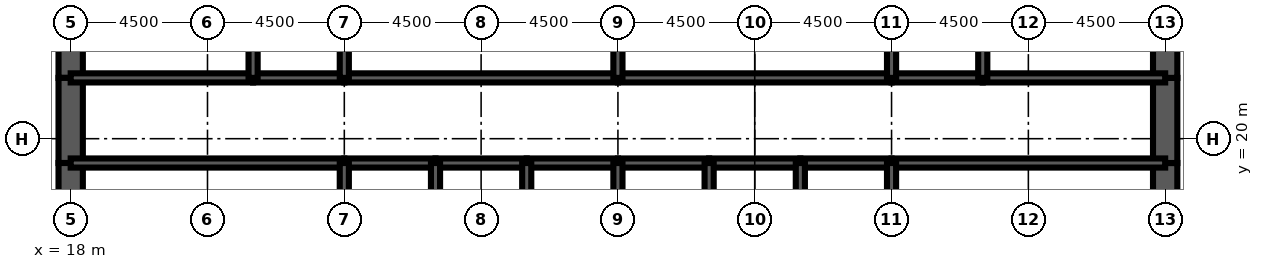
"""IFC4 building model, lengths in metres.
Left out: names, types, materials, properties, quantities, classifications, styles, units other than length and angle.
Written with IfcOpenShell. Run it as: python <this file> out.ifc"""

import sys

from ifc_helpers import new_model, si_unit, direction, frame, frame_2d, origin, place, context, subcontext, project, spatial, rectangle, extrude, element, fill, save


model = new_model("IFC4")
c1 = context("Model", 3, precision=1e-05, world=origin(), true_north=direction((0.0, 1.0)))
c2 = subcontext(c1, "Body", "Model", "MODEL_VIEW")
j1 = project(units=[si_unit("LENGTHUNIT", "METRE"), si_unit("PLANEANGLEUNIT", "RADIAN")], contexts=[c1])
p1 = place(None, origin())
s1 = spatial("IfcSite", under=j1, at=p1, CompositionType="ELEMENT")
p2 = place(p1, origin())
s2 = spatial("IfcBuilding", under=s1, at=p2, CompositionType="ELEMENT")
p3 = place(p2, frame((0.0, 0.0, 206.8)))
s3 = spatial("IfcBuildingStorey", under=s2, at=p3, CompositionType="ELEMENT", Elevation=206.8)
p4 = place(p3, frame((18.0, 26.0, 0.0), z_axis=(0.0, 0.0, 1.0), x_axis=(0.0, -1.0, 0.0)))
e1 = element("IfcWall", 1, at=p4, inside=s3, PredefinedType="SHEAR", context=c2, shape_type="SweptSolid", body=[
    extrude(rectangle(XDim=4.0, YDim=0.8, at=frame_2d((2.0, 0.0))), origin(), (0.0, 0.0, 1.0), 4.2),
])
p5 = place(p3, frame((18.0, 22.0, 0.0), z_axis=(0.0, 0.0, 1.0), x_axis=(0.0, -1.0, 0.0)))
e2 = element("IfcWall", 2, at=p5, inside=s3, PredefinedType="SHEAR", context=c2, shape_type="SweptSolid", body=[
    extrude(rectangle(XDim=2.8, YDim=0.8, at=frame_2d((1.4, 0.0))), origin(), (0.0, 0.0, 1.0), 4.2),
])
p6 = place(p5, frame((0.6, 0.0, 0.0)))
e3 = element("IfcOpeningElement", 3, at=p6, cuts=e2, PredefinedType="OPENING", context=c2, shape_type="SweptSolid", body=[
    extrude(rectangle(XDim=1.8, YDim=2.1, at=frame_2d((0.9, 1.05))), frame((0.0, 0.41, 0.0), z_axis=(0.0, -1.0, 0.0), x_axis=(1.0, 0.0, 0.0)), (0.0, 0.0, 1.0), 0.82),
])
for number, where, z_axis, x_axis in (
    (4, (18.0, 19.2, 0.0), (0.0, 0.0, 1.0), (0.0, -1.0, 0.0)),
    (5, (54.0, 16.0, 0.0), (0.0, 0.0, 1.0), (0.0, 1.0, 0.0)),
):
    element("IfcWall", number, at=place(p3, frame(where, z_axis=z_axis, x_axis=x_axis)), inside=s3, PredefinedType="SHEAR", context=c2, shape_type="SweptSolid", body=[
        extrude(rectangle(XDim=3.2, YDim=0.8, at=frame_2d((1.6, 0.0))), origin(), (0.0, 0.0, 1.0), 4.2),
    ])
p7 = place(p3, frame((54.0, 19.2, 0.0), z_axis=(0.0, 0.0, 1.0), x_axis=(0.0, 1.0, 0.0)))
e6 = element("IfcWall", 6, at=p7, inside=s3, PredefinedType="SHEAR", context=c2, shape_type="SweptSolid", body=[
    extrude(rectangle(XDim=2.8, YDim=0.8, at=frame_2d((1.4, 0.0))), origin(), (0.0, 0.0, 1.0), 4.2),
])
p8 = place(p7, frame((0.4, 0.0, 0.0)))
e7 = element("IfcOpeningElement", 7, at=p8, cuts=e6, PredefinedType="OPENING", context=c2, shape_type="SweptSolid", body=[
    extrude(rectangle(XDim=1.8, YDim=2.1, at=frame_2d((0.9, 1.05))), frame((0.0, 0.41, 0.0), z_axis=(0.0, -1.0, 0.0), x_axis=(1.0, 0.0, 0.0)), (0.0, 0.0, 1.0), 0.82),
])
p9 = place(p3, frame((54.0, 22.0, 0.0), z_axis=(0.0, 0.0, 1.0), x_axis=(0.0, 1.0, 0.0)))
e8 = element("IfcWall", 8, at=p9, inside=s3, PredefinedType="SHEAR", context=c2, shape_type="SweptSolid", body=[
    extrude(rectangle(XDim=4.0, YDim=0.8, at=frame_2d((2.0, 0.0))), origin(), (0.0, 0.0, 1.0), 4.2),
])
p10 = place(p3, frame((18.0, 19.2, 0.0), z_axis=(0.0, 0.0, 1.0), x_axis=(1.0, 0.0, 0.0)))
e9 = element("IfcWall", 9, at=p10, inside=s3, PredefinedType="SOLIDWALL", context=c2, shape_type="SweptSolid", body=[
    extrude(rectangle(XDim=9.0, YDim=0.3, at=frame_2d((4.5, 0.0))), origin(), (0.0, 0.0, 1.0), 4.2),
])
p11 = place(p10, frame((0.65, 0.0, 0.0)))
e10 = element("IfcOpeningElement", 10, at=p11, cuts=e9, PredefinedType="OPENING", context=c2, shape_type="SweptSolid", body=[
    extrude(rectangle(XDim=1.0, YDim=2.1, at=frame_2d((0.5, 1.05))), frame((0.0, 0.16, 0.0), z_axis=(0.0, -1.0, 0.0), x_axis=(1.0, 0.0, 0.0)), (0.0, 0.0, 1.0), 0.32),
])
p12 = place(p3, frame((27.0, 19.2, 0.0), z_axis=(0.0, 0.0, 1.0), x_axis=(1.0, 0.0, 0.0)))
e11 = element("IfcWall", 11, at=p12, inside=s3, PredefinedType="SOLIDWALL", context=c2, shape_type="SweptSolid", body=[
    extrude(rectangle(XDim=3.0, YDim=0.3, at=frame_2d((1.5, 0.0))), origin(), (0.0, 0.0, 1.0), 4.2),
])
p13 = place(p12, frame((0.95, 0.0, 0.0)))
e12 = element("IfcOpeningElement", 12, at=p13, cuts=e11, PredefinedType="OPENING", context=c2, shape_type="SweptSolid", body=[
    extrude(rectangle(XDim=1.1, YDim=2.2, at=frame_2d((0.55, 1.1))), frame((0.0, 0.16, 0.0), z_axis=(0.0, -1.0, 0.0), x_axis=(1.0, 0.0, 0.0)), (0.0, 0.0, 1.0), 0.32),
])
p14 = place(p3, frame((30.0, 19.2, 0.0), z_axis=(0.0, 0.0, 1.0), x_axis=(1.0, 0.0, 0.0)))
e13 = element("IfcWall", 13, at=p14, inside=s3, PredefinedType="SOLIDWALL", context=c2, shape_type="SweptSolid", body=[
    extrude(rectangle(XDim=3.0, YDim=0.3, at=frame_2d((1.5, 0.0))), origin(), (0.0, 0.0, 1.0), 4.2),
])
p15 = place(p14, frame((0.95, 0.0, 0.0)))
e14 = element("IfcOpeningElement", 14, at=p15, cuts=e13, PredefinedType="OPENING", context=c2, shape_type="SweptSolid", body=[
    extrude(rectangle(XDim=1.1, YDim=2.2, at=frame_2d((0.55, 1.1))), frame((0.0, 0.16, 0.0), z_axis=(0.0, -1.0, 0.0), x_axis=(1.0, 0.0, 0.0)), (0.0, 0.0, 1.0), 0.32),
])
p16 = place(p3, frame((33.0, 19.2, 0.0), z_axis=(0.0, 0.0, 1.0), x_axis=(1.0, 0.0, 0.0)))
e15 = element("IfcWall", 15, at=p16, inside=s3, PredefinedType="SOLIDWALL", context=c2, shape_type="SweptSolid", body=[
    extrude(rectangle(XDim=3.0, YDim=0.3, at=frame_2d((1.5, 0.0))), origin(), (0.0, 0.0, 1.0), 4.2),
])
p17 = place(p16, frame((0.95, 0.0, 0.0)))
e16 = element("IfcOpeningElement", 16, at=p17, cuts=e15, PredefinedType="OPENING", context=c2, shape_type="SweptSolid", body=[
    extrude(rectangle(XDim=1.1, YDim=2.2, at=frame_2d((0.55, 1.1))), frame((0.0, 0.16, 0.0), z_axis=(0.0, -1.0, 0.0), x_axis=(1.0, 0.0, 0.0)), (0.0, 0.0, 1.0), 0.32),
])
p18 = place(p3, frame((36.0, 19.2, 0.0), z_axis=(0.0, 0.0, 1.0), x_axis=(1.0, 0.0, 0.0)))
e17 = element("IfcWall", 17, at=p18, inside=s3, PredefinedType="SOLIDWALL", context=c2, shape_type="SweptSolid", body=[
    extrude(rectangle(XDim=3.0, YDim=0.3, at=frame_2d((1.5, 0.0))), origin(), (0.0, 0.0, 1.0), 4.2),
])
p19 = place(p18, frame((0.95, 0.0, 0.0)))
e18 = element("IfcOpeningElement", 18, at=p19, cuts=e17, PredefinedType="OPENING", context=c2, shape_type="SweptSolid", body=[
    extrude(rectangle(XDim=1.1, YDim=2.2, at=frame_2d((0.55, 1.1))), frame((0.0, 0.16, 0.0), z_axis=(0.0, -1.0, 0.0), x_axis=(1.0, 0.0, 0.0)), (0.0, 0.0, 1.0), 0.32),
])
p20 = place(p3, frame((39.0, 19.2, 0.0), z_axis=(0.0, 0.0, 1.0), x_axis=(1.0, 0.0, 0.0)))
e19 = element("IfcWall", 19, at=p20, inside=s3, PredefinedType="SOLIDWALL", context=c2, shape_type="SweptSolid", body=[
    extrude(rectangle(XDim=3.0, YDim=0.3, at=frame_2d((1.5, 0.0))), origin(), (0.0, 0.0, 1.0), 4.2),
])
p21 = place(p20, frame((1.0, 0.0, 0.0)))
e20 = element("IfcOpeningElement", 20, at=p21, cuts=e19, PredefinedType="OPENING", context=c2, shape_type="SweptSolid", body=[
    extrude(rectangle(XDim=1.0, YDim=2.1, at=frame_2d((0.5, 1.05))), frame((0.0, 0.16, 0.0), z_axis=(0.0, -1.0, 0.0), x_axis=(1.0, 0.0, 0.0)), (0.0, 0.0, 1.0), 0.32),
])
p22 = place(p3, frame((42.0, 19.2, 0.0), z_axis=(0.0, 0.0, 1.0), x_axis=(1.0, 0.0, 0.0)))
e21 = element("IfcWall", 21, at=p22, inside=s3, PredefinedType="SOLIDWALL", context=c2, shape_type="SweptSolid", body=[
    extrude(rectangle(XDim=3.0, YDim=0.3, at=frame_2d((1.5, 0.0))), origin(), (0.0, 0.0, 1.0), 4.2),
])
p23 = place(p22, frame((1.0, 0.0, 0.0)))
e22 = element("IfcOpeningElement", 22, at=p23, cuts=e21, PredefinedType="OPENING", context=c2, shape_type="SweptSolid", body=[
    extrude(rectangle(XDim=1.0, YDim=2.1, at=frame_2d((0.5, 1.05))), frame((0.0, 0.16, 0.0), z_axis=(0.0, -1.0, 0.0), x_axis=(1.0, 0.0, 0.0)), (0.0, 0.0, 1.0), 0.32),
])
p24 = place(p3, frame((45.0, 19.2, 0.0), z_axis=(0.0, 0.0, 1.0), x_axis=(1.0, 0.0, 0.0)))
e23 = element("IfcWall", 23, at=p24, inside=s3, PredefinedType="SOLIDWALL", context=c2, shape_type="SweptSolid", body=[
    extrude(rectangle(XDim=9.0, YDim=0.3, at=frame_2d((4.5, 0.0))), origin(), (0.0, 0.0, 1.0), 4.2),
])
p25 = place(p24, frame((7.35, 0.0, 0.0)))
e24 = element("IfcOpeningElement", 24, at=p25, cuts=e23, PredefinedType="OPENING", context=c2, shape_type="SweptSolid", body=[
    extrude(rectangle(XDim=1.0, YDim=2.1, at=frame_2d((0.5, 1.05))), frame((0.0, 0.16, 0.0), z_axis=(0.0, -1.0, 0.0), x_axis=(1.0, 0.0, 0.0)), (0.0, 0.0, 1.0), 0.32),
])
p26 = place(p3, frame((18.0, 22.0, 0.0), z_axis=(0.0, 0.0, 1.0), x_axis=(1.0, 0.0, 0.0)))
e25 = element("IfcWall", 25, at=p26, inside=s3, PredefinedType="SOLIDWALL", context=c2, shape_type="SweptSolid", body=[
    extrude(rectangle(XDim=6.0, YDim=0.3, at=frame_2d((3.0, 0.0))), origin(), (0.0, 0.0, 1.0), 4.2),
])
p27 = place(p26, frame((4.4, 0.0, 0.0)))
e26 = element("IfcOpeningElement", 26, at=p27, cuts=e25, PredefinedType="OPENING", context=c2, shape_type="SweptSolid", body=[
    extrude(rectangle(XDim=1.0, YDim=2.1, at=frame_2d((0.5, 1.05))), frame((0.0, 0.16, 0.0), z_axis=(0.0, -1.0, 0.0), x_axis=(1.0, 0.0, 0.0)), (0.0, 0.0, 1.0), 0.32),
])
p28 = place(p26, frame((0.95, 0.0, 0.0)))
e27 = element("IfcOpeningElement", 27, at=p28, cuts=e25, PredefinedType="OPENING", context=c2, shape_type="SweptSolid", body=[
    extrude(rectangle(XDim=1.0, YDim=2.1, at=frame_2d((0.5, 1.05))), frame((0.0, 0.16, 0.0), z_axis=(0.0, -1.0, 0.0), x_axis=(1.0, 0.0, 0.0)), (0.0, 0.0, 1.0), 0.32),
])
p29 = place(p3, frame((24.0, 22.0, 0.0), z_axis=(0.0, 0.0, 1.0), x_axis=(1.0, 0.0, 0.0)))
e28 = element("IfcWall", 28, at=p29, inside=s3, PredefinedType="SOLIDWALL", context=c2, shape_type="SweptSolid", body=[
    extrude(rectangle(XDim=3.0, YDim=0.3, at=frame_2d((1.5, 0.0))), origin(), (0.0, 0.0, 1.0), 4.2),
])
p30 = place(p29, frame((1.0, 0.0, 0.0)))
e29 = element("IfcOpeningElement", 29, at=p30, cuts=e28, PredefinedType="OPENING", context=c2, shape_type="SweptSolid", body=[
    extrude(rectangle(XDim=1.0, YDim=2.1, at=frame_2d((0.5, 1.05))), frame((0.0, 0.16, 0.0), z_axis=(0.0, -1.0, 0.0), x_axis=(1.0, 0.0, 0.0)), (0.0, 0.0, 1.0), 0.32),
])
p31 = place(p3, frame((27.0, 22.0, 0.0), z_axis=(0.0, 0.0, 1.0), x_axis=(1.0, 0.0, 0.0)))
e30 = element("IfcWall", 30, at=p31, inside=s3, PredefinedType="SOLIDWALL", context=c2, shape_type="SweptSolid", body=[
    extrude(rectangle(XDim=9.0, YDim=0.3, at=frame_2d((4.5, 0.0))), origin(), (0.0, 0.0, 1.0), 4.2),
])
p32 = place(p31, frame((4.0, 0.0, 0.0)))
e31 = element("IfcOpeningElement", 31, at=p32, cuts=e30, PredefinedType="OPENING", context=c2, shape_type="SweptSolid", body=[
    extrude(rectangle(XDim=1.0, YDim=2.1, at=frame_2d((0.5, 1.05))), frame((0.0, 0.16, 0.0), z_axis=(0.0, -1.0, 0.0), x_axis=(1.0, 0.0, 0.0)), (0.0, 0.0, 1.0), 0.32),
])
p33 = place(p3, frame((36.0, 22.0, 0.0), z_axis=(0.0, 0.0, 1.0), x_axis=(1.0, 0.0, 0.0)))
e32 = element("IfcWall", 32, at=p33, inside=s3, PredefinedType="SOLIDWALL", context=c2, shape_type="SweptSolid", body=[
    extrude(rectangle(XDim=9.0, YDim=0.3, at=frame_2d((4.5, 0.0))), origin(), (0.0, 0.0, 1.0), 4.2),
])
p34 = place(p33, frame((4.0, 0.0, 0.0)))
e33 = element("IfcOpeningElement", 33, at=p34, cuts=e32, PredefinedType="OPENING", context=c2, shape_type="SweptSolid", body=[
    extrude(rectangle(XDim=1.0, YDim=2.1, at=frame_2d((0.5, 1.05))), frame((0.0, 0.16, 0.0), z_axis=(0.0, -1.0, 0.0), x_axis=(1.0, 0.0, 0.0)), (0.0, 0.0, 1.0), 0.32),
])
p35 = place(p3, frame((45.0, 22.0, 0.0), z_axis=(0.0, 0.0, 1.0), x_axis=(1.0, 0.0, 0.0)))
e34 = element("IfcWall", 34, at=p35, inside=s3, PredefinedType="SOLIDWALL", context=c2, shape_type="SweptSolid", body=[
    extrude(rectangle(XDim=3.0, YDim=0.3, at=frame_2d((1.5, 0.0))), origin(), (0.0, 0.0, 1.0), 4.2),
])
p36 = place(p35, frame((1.0, 0.0, 0.0)))
e35 = element("IfcOpeningElement", 35, at=p36, cuts=e34, PredefinedType="OPENING", context=c2, shape_type="SweptSolid", body=[
    extrude(rectangle(XDim=1.0, YDim=2.1, at=frame_2d((0.5, 1.05))), frame((0.0, 0.16, 0.0), z_axis=(0.0, -1.0, 0.0), x_axis=(1.0, 0.0, 0.0)), (0.0, 0.0, 1.0), 0.32),
])
p37 = place(p3, frame((48.0, 22.0, 0.0), z_axis=(0.0, 0.0, 1.0), x_axis=(1.0, 0.0, 0.0)))
e36 = element("IfcWall", 36, at=p37, inside=s3, PredefinedType="SOLIDWALL", context=c2, shape_type="SweptSolid", body=[
    extrude(rectangle(XDim=6.0, YDim=0.3, at=frame_2d((3.0, 0.0))), origin(), (0.0, 0.0, 1.0), 4.2),
])
p38 = place(p37, frame((2.0, 0.0, 0.0)))
e37 = element("IfcOpeningElement", 37, at=p38, cuts=e36, PredefinedType="OPENING", context=c2, shape_type="SweptSolid", body=[
    extrude(rectangle(XDim=1.0, YDim=2.1, at=frame_2d((0.5, 1.05))), frame((0.0, 0.16, 0.0), z_axis=(0.0, -1.0, 0.0), x_axis=(1.0, 0.0, 0.0)), (0.0, 0.0, 1.0), 0.32),
])
p39 = place(p37, frame((4.35, 0.0, 0.0)))
e38 = element("IfcOpeningElement", 38, at=p39, cuts=e36, PredefinedType="OPENING", context=c2, shape_type="SweptSolid", body=[
    extrude(rectangle(XDim=1.0, YDim=2.1, at=frame_2d((0.5, 1.05))), frame((0.0, 0.16, 0.0), z_axis=(0.0, -1.0, 0.0), x_axis=(1.0, 0.0, 0.0)), (0.0, 0.0, 1.0), 0.32),
])
for number, where, z_axis, x_axis in (
    (39, (27.0, 16.0, 0.0), (0.0, 0.0, 1.0), (0.0, 1.0, 0.0)),
    (40, (30.0, 16.0, 0.0), (0.0, 0.0, 1.0), (0.0, 1.0, 0.0)),
    (41, (33.0, 16.0, 0.0), (0.0, 0.0, 1.0), (0.0, 1.0, 0.0)),
    (42, (36.0, 16.0, 0.0), (0.0, 0.0, 1.0), (0.0, 1.0, 0.0)),
    (43, (39.0, 16.0, 0.0), (0.0, 0.0, 1.0), (0.0, 1.0, 0.0)),
    (44, (42.0, 16.0, 0.0), (0.0, 0.0, 1.0), (0.0, 1.0, 0.0)),
    (45, (45.0, 16.0, 0.0), (0.0, 0.0, 1.0), (0.0, 1.0, 0.0)),
):
    element("IfcWall", number, at=place(p3, frame(where, z_axis=z_axis, x_axis=x_axis)), inside=s3, PredefinedType="SOLIDWALL", context=c2, shape_type="SweptSolid", body=[
        extrude(rectangle(XDim=3.2, YDim=0.3, at=frame_2d((1.6, 0.0))), origin(), (0.0, 0.0, 1.0), 4.2),
    ])
for number, where, z_axis, x_axis in (
    (46, (24.0, 22.0, 0.0), (0.0, 0.0, 1.0), (0.0, 1.0, 0.0)),
    (47, (27.0, 22.0, 0.0), (0.0, 0.0, 1.0), (0.0, 1.0, 0.0)),
    (48, (36.0, 22.0, 0.0), (0.0, 0.0, 1.0), (0.0, 1.0, 0.0)),
    (49, (45.0, 22.0, 0.0), (0.0, 0.0, 1.0), (0.0, 1.0, 0.0)),
    (50, (48.0, 22.0, 0.0), (0.0, 0.0, 1.0), (0.0, 1.0, 0.0)),
):
    element("IfcWall", number, at=place(p3, frame(where, z_axis=z_axis, x_axis=x_axis)), inside=s3, PredefinedType="SOLIDWALL", context=c2, shape_type="SweptSolid", body=[
        extrude(rectangle(XDim=4.0, YDim=0.3, at=frame_2d((2.0, 0.0))), origin(), (0.0, 0.0, 1.0), 4.2),
    ])
p40 = place(p3, frame((38.0, 22.15, 0.0), z_axis=(0.0, 0.0, 1.0), x_axis=(0.0, 1.0, 0.0)))
e51 = element("IfcWall", 51, at=p40, inside=s3, PredefinedType="PARTITIONING", context=c2, shape_type="SweptSolid", body=[
    extrude(rectangle(XDim=3.7, YDim=0.15, at=frame_2d((1.85, 0.0))), origin(), (0.0, 0.0, 1.0), 3.0),
])
p41 = place(p40, frame((2.2, 0.0, 0.0)))
e52 = element("IfcOpeningElement", 52, at=p41, cuts=e51, PredefinedType="OPENING", context=c2, shape_type="SweptSolid", body=[
    extrude(rectangle(XDim=1.0, YDim=2.1, at=frame_2d((0.5, 1.05))), frame((0.0, 0.085, 0.0), z_axis=(0.0, -1.0, 0.0), x_axis=(1.0, 0.0, 0.0)), (0.0, 0.0, 1.0), 0.17),
])
for number, where, z_axis, x_axis in (
    (53, (20.575, 22.15, 0.0), (0.0, 0.0, 1.0), (0.0, 1.0, 0.0)),
    (54, (52.025, 22.15, 0.0), (0.0, 0.0, 1.0), (0.0, 1.0, 0.0)),
):
    element("IfcWall", number, at=place(p3, frame(where, z_axis=z_axis, x_axis=x_axis)), inside=s3, PredefinedType="PARTITIONING", context=c2, shape_type="SweptSolid", body=[
        extrude(rectangle(XDim=3.7, YDim=0.15, at=frame_2d((1.85, 0.0))), origin(), (0.0, 0.0, 1.0), 3.0),
    ])
p42 = place(p13, origin())
e55 = element("IfcDoor", 55, at=p42, inside=s3, OperationType="DOUBLE_DOOR_SLIDING", PredefinedType="USERDEFINED", context=c2, shape_type="SweptSolid", body=[
    extrude(rectangle(XDim=1.1, YDim=2.2, at=frame_2d((0.55, 1.1))), frame((0.0, 0.025, 0.0), z_axis=(0.0, -1.0, 0.0), x_axis=(1.0, 0.0, 0.0)), (0.0, 0.0, 1.0), 0.05),
])
fill(e12, e55)
p43 = place(p15, origin())
e56 = element("IfcDoor", 56, at=p43, inside=s3, OperationType="DOUBLE_DOOR_SLIDING", PredefinedType="USERDEFINED", context=c2, shape_type="SweptSolid", body=[
    extrude(rectangle(XDim=1.1, YDim=2.2, at=frame_2d((0.55, 1.1))), frame((0.0, 0.025, 0.0), z_axis=(0.0, -1.0, 0.0), x_axis=(1.0, 0.0, 0.0)), (0.0, 0.0, 1.0), 0.05),
])
fill(e14, e56)
p44 = place(p17, origin())
e57 = element("IfcDoor", 57, at=p44, inside=s3, OperationType="DOUBLE_DOOR_SLIDING", PredefinedType="USERDEFINED", context=c2, shape_type="SweptSolid", body=[
    extrude(rectangle(XDim=1.1, YDim=2.2, at=frame_2d((0.55, 1.1))), frame((0.0, 0.025, 0.0), z_axis=(0.0, -1.0, 0.0), x_axis=(1.0, 0.0, 0.0)), (0.0, 0.0, 1.0), 0.05),
])
fill(e16, e57)
p45 = place(p19, origin())
e58 = element("IfcDoor", 58, at=p45, inside=s3, OperationType="DOUBLE_DOOR_SLIDING", PredefinedType="USERDEFINED", context=c2, shape_type="SweptSolid", body=[
    extrude(rectangle(XDim=1.1, YDim=2.2, at=frame_2d((0.55, 1.1))), frame((0.0, 0.025, 0.0), z_axis=(0.0, -1.0, 0.0), x_axis=(1.0, 0.0, 0.0)), (0.0, 0.0, 1.0), 0.05),
])
fill(e18, e58)
p46 = place(p11, origin())
e59 = element("IfcDoor", 59, at=p46, inside=s3, OperationType="SINGLE_SWING_LEFT", PredefinedType="DOOR", context=c2, shape_type="SweptSolid", body=[
    extrude(rectangle(XDim=1.0, YDim=2.1, at=frame_2d((0.5, 1.05))), frame((0.0, 0.025, 0.0), z_axis=(0.0, -1.0, 0.0), x_axis=(1.0, 0.0, 0.0)), (0.0, 0.0, 1.0), 0.05),
])
fill(e10, e59)
p47 = place(p25, origin())
e60 = element("IfcDoor", 60, at=p47, inside=s3, OperationType="SINGLE_SWING_RIGHT", PredefinedType="DOOR", context=c2, shape_type="SweptSolid", body=[
    extrude(rectangle(XDim=1.0, YDim=2.1, at=frame_2d((0.5, 1.05))), frame((0.0, 0.025, 0.0), z_axis=(0.0, -1.0, 0.0), x_axis=(1.0, 0.0, 0.0)), (0.0, 0.0, 1.0), 0.05),
])
fill(e24, e60)
p48 = place(p6, origin())
e61 = element("IfcDoor", 61, at=p48, inside=s3, OperationType="SINGLE_SWING_LEFT", PredefinedType="DOOR", context=c2, shape_type="SweptSolid", body=[
    extrude(rectangle(XDim=1.8, YDim=2.1, at=frame_2d((0.9, 1.05))), frame((0.0, 0.4, 0.0), z_axis=(0.0, -1.0, 0.0), x_axis=(1.0, 0.0, 0.0)), (0.0, 0.0, 1.0), 0.8),
])
fill(e3, e61)
p49 = place(p8, origin())
e62 = element("IfcDoor", 62, at=p49, inside=s3, OperationType="SINGLE_SWING_LEFT", PredefinedType="DOOR", context=c2, shape_type="SweptSolid", body=[
    extrude(rectangle(XDim=1.8, YDim=2.1, at=frame_2d((0.9, 1.05))), frame((0.0, 0.4, 0.0), z_axis=(0.0, -1.0, 0.0), x_axis=(1.0, 0.0, 0.0)), (0.0, 0.0, 1.0), 0.8),
])
fill(e7, e62)
p50 = place(p27, origin())
e63 = element("IfcDoor", 63, at=p50, inside=s3, OperationType="SINGLE_SWING_RIGHT", PredefinedType="DOOR", context=c2, shape_type="SweptSolid", body=[
    extrude(rectangle(XDim=1.0, YDim=2.1, at=frame_2d((0.5, 1.05))), frame((0.0, 0.025, 0.0), z_axis=(0.0, -1.0, 0.0), x_axis=(1.0, 0.0, 0.0)), (0.0, 0.0, 1.0), 0.05),
])
fill(e26, e63)
p51 = place(p30, origin())
e64 = element("IfcDoor", 64, at=p51, inside=s3, OperationType="SINGLE_SWING_LEFT", PredefinedType="DOOR", context=c2, shape_type="SweptSolid", body=[
    extrude(rectangle(XDim=1.0, YDim=2.1, at=frame_2d((0.5, 1.05))), frame((0.0, 0.025, 0.0), z_axis=(0.0, -1.0, 0.0), x_axis=(1.0, 0.0, 0.0)), (0.0, 0.0, 1.0), 0.05),
])
fill(e29, e64)
p52 = place(p32, origin())
e65 = element("IfcDoor", 65, at=p52, inside=s3, OperationType="SINGLE_SWING_LEFT", PredefinedType="DOOR", context=c2, shape_type="SweptSolid", body=[
    extrude(rectangle(XDim=1.0, YDim=2.1, at=frame_2d((0.5, 1.05))), frame((0.0, 0.025, 0.0), z_axis=(0.0, -1.0, 0.0), x_axis=(1.0, 0.0, 0.0)), (0.0, 0.0, 1.0), 0.05),
])
fill(e31, e65)
p53 = place(p34, origin())
e66 = element("IfcDoor", 66, at=p53, inside=s3, OperationType="SINGLE_SWING_LEFT", PredefinedType="DOOR", context=c2, shape_type="SweptSolid", body=[
    extrude(rectangle(XDim=1.0, YDim=2.1, at=frame_2d((0.5, 1.05))), frame((0.0, 0.025, 0.0), z_axis=(0.0, -1.0, 0.0), x_axis=(1.0, 0.0, 0.0)), (0.0, 0.0, 1.0), 0.05),
])
fill(e33, e66)
p54 = place(p36, origin())
e67 = element("IfcDoor", 67, at=p54, inside=s3, OperationType="SINGLE_SWING_LEFT", PredefinedType="DOOR", context=c2, shape_type="SweptSolid", body=[
    extrude(rectangle(XDim=1.0, YDim=2.1, at=frame_2d((0.5, 1.05))), frame((0.0, 0.025, 0.0), z_axis=(0.0, -1.0, 0.0), x_axis=(1.0, 0.0, 0.0)), (0.0, 0.0, 1.0), 0.05),
])
fill(e35, e67)
p55 = place(p38, origin())
e68 = element("IfcDoor", 68, at=p55, inside=s3, OperationType="SINGLE_SWING_LEFT", PredefinedType="DOOR", context=c2, shape_type="SweptSolid", body=[
    extrude(rectangle(XDim=1.0, YDim=2.1, at=frame_2d((0.5, 1.05))), frame((0.0, 0.025, 0.0), z_axis=(0.0, -1.0, 0.0), x_axis=(1.0, 0.0, 0.0)), (0.0, 0.0, 1.0), 0.05),
])
fill(e37, e68)
p56 = place(p28, origin())
e69 = element("IfcDoor", 69, at=p56, inside=s3, OperationType="SINGLE_SWING_LEFT", PredefinedType="DOOR", context=c2, shape_type="SweptSolid", body=[
    extrude(rectangle(XDim=1.0, YDim=2.1, at=frame_2d((0.5, 1.05))), frame((0.0, 0.025, 0.0), z_axis=(0.0, -1.0, 0.0), x_axis=(1.0, 0.0, 0.0)), (0.0, 0.0, 1.0), 0.05),
])
fill(e27, e69)
p57 = place(p39, origin())
e70 = element("IfcDoor", 70, at=p57, inside=s3, OperationType="SINGLE_SWING_RIGHT", PredefinedType="DOOR", context=c2, shape_type="SweptSolid", body=[
    extrude(rectangle(XDim=1.0, YDim=2.1, at=frame_2d((0.5, 1.05))), frame((0.0, 0.025, 0.0), z_axis=(0.0, -1.0, 0.0), x_axis=(1.0, 0.0, 0.0)), (0.0, 0.0, 1.0), 0.05),
])
fill(e38, e70)
p58 = place(p21, origin())
e71 = element("IfcDoor", 71, at=p58, inside=s3, OperationType="SINGLE_SWING_LEFT", PredefinedType="DOOR", context=c2, shape_type="SweptSolid", body=[
    extrude(rectangle(XDim=1.0, YDim=2.1, at=frame_2d((0.5, 1.05))), frame((0.0, 0.025, 0.0), z_axis=(0.0, -1.0, 0.0), x_axis=(1.0, 0.0, 0.0)), (0.0, 0.0, 1.0), 0.05),
])
fill(e20, e71)
p59 = place(p23, origin())
e72 = element("IfcDoor", 72, at=p59, inside=s3, OperationType="SINGLE_SWING_LEFT", PredefinedType="DOOR", context=c2, shape_type="SweptSolid", body=[
    extrude(rectangle(XDim=1.0, YDim=2.1, at=frame_2d((0.5, 1.05))), frame((0.0, 0.025, 0.0), z_axis=(0.0, -1.0, 0.0), x_axis=(1.0, 0.0, 0.0)), (0.0, 0.0, 1.0), 0.05),
])
fill(e22, e72)
save(model, sys.argv[1])
